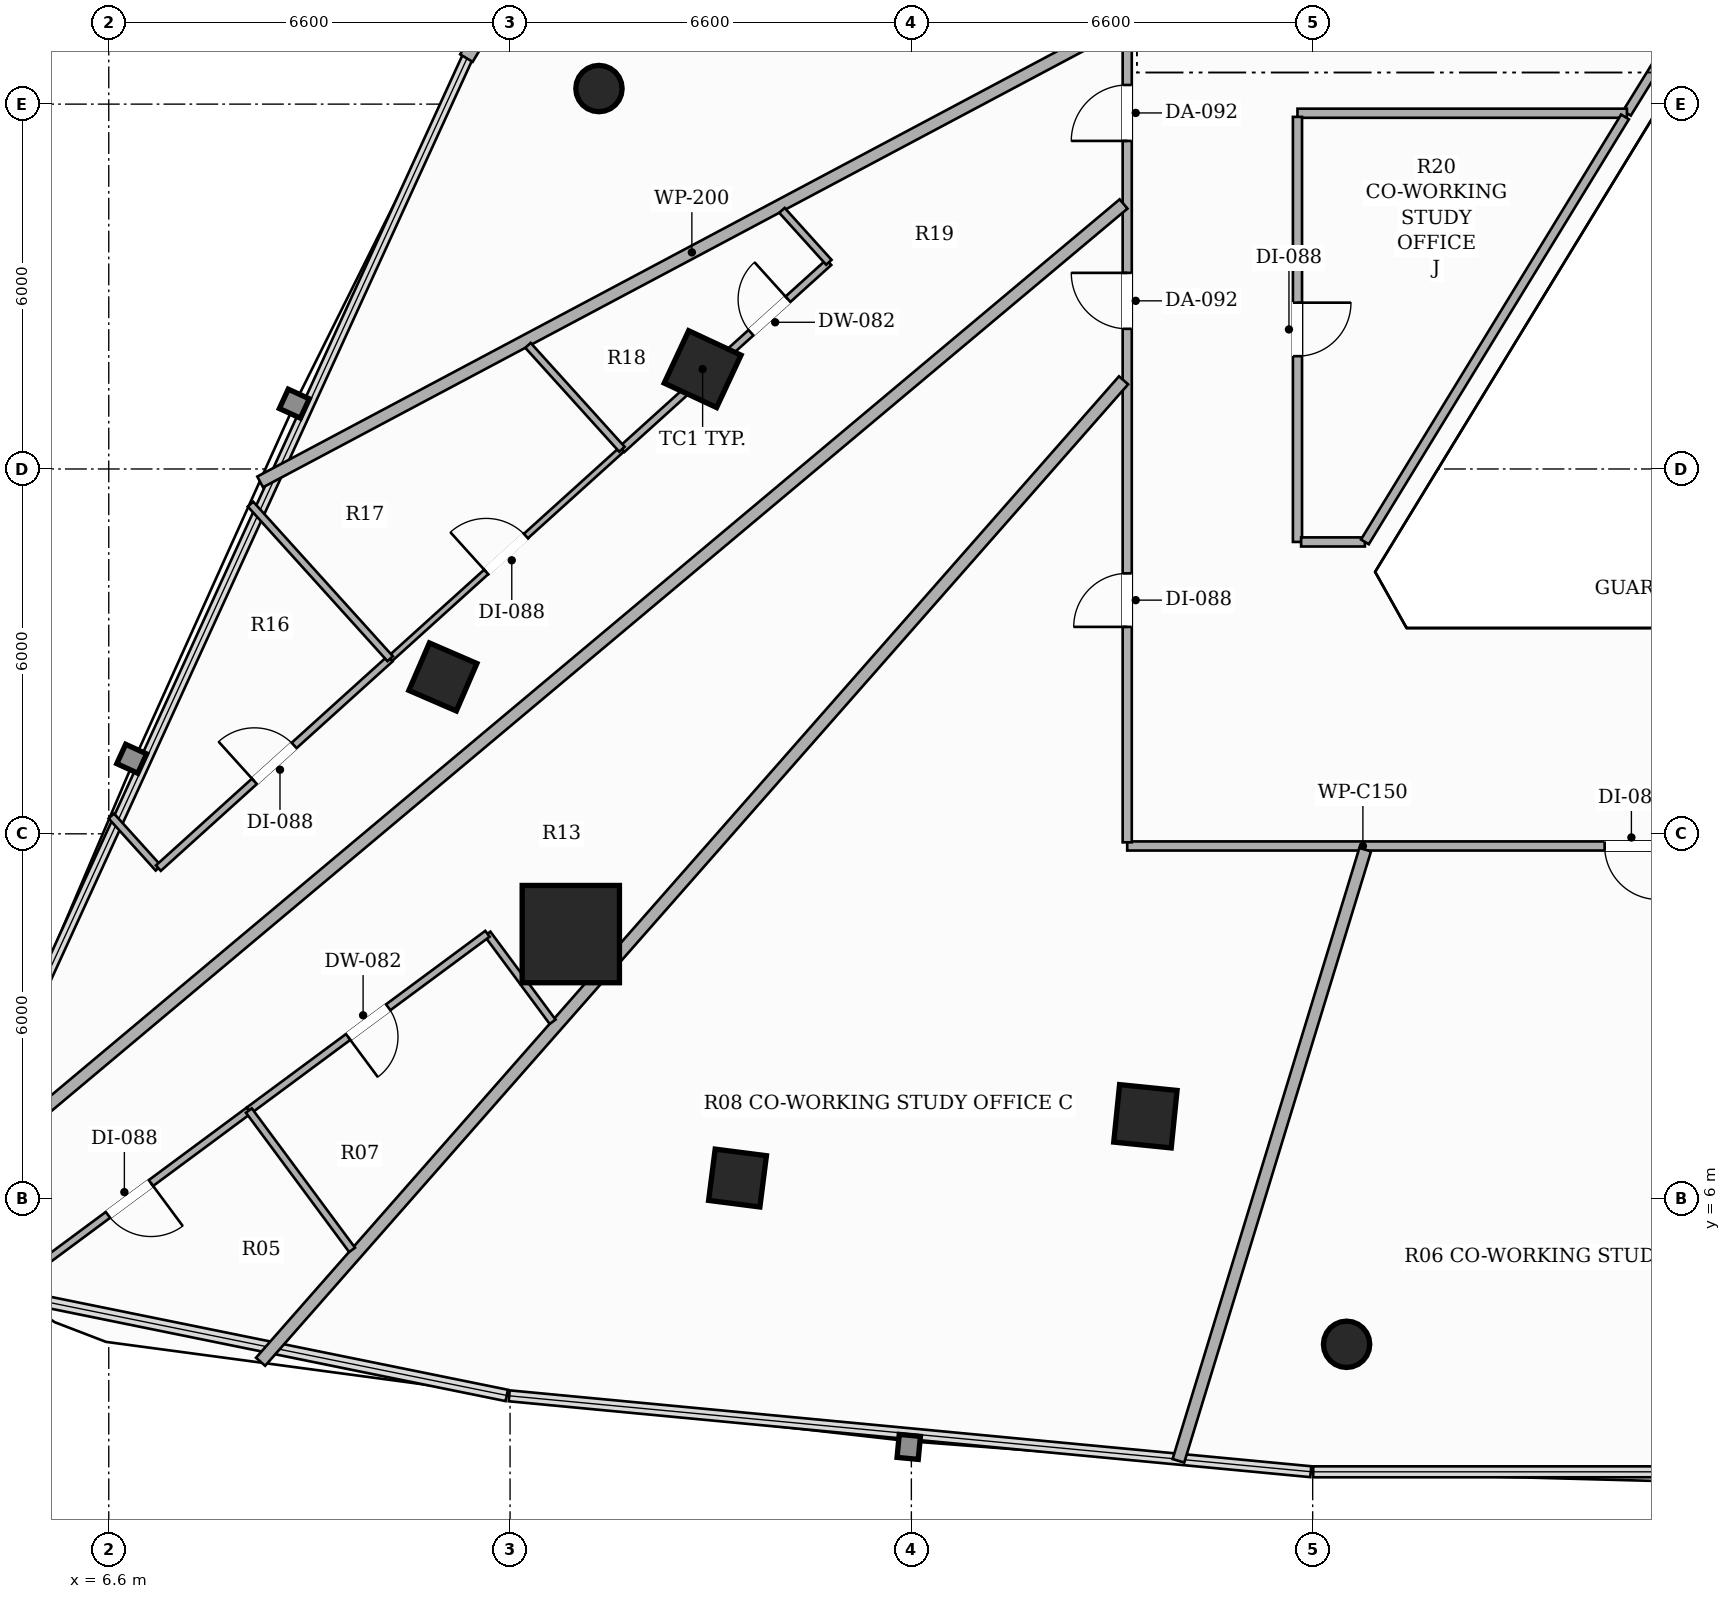
"""IFC4 building model, lengths in metres.
Left out: names, types, materials, properties, quantities, classifications, styles, units other than length and angle.
Written with IfcOpenShell. Run it as: python <this file> out.ifc"""

import sys

from ifc_helpers import new_model, si_unit, direction, frame, frame_2d, origin, origin_2d, place, context, subcontext, project, spatial, rectangle, hollow_rectangle, hollow_circle, extrude, element, fill, save


model = new_model("IFC4")
c1 = context("Model", 3, precision=1e-05, world=origin(), true_north=direction((0.0, 1.0)))
c2 = subcontext(c1, "Body", "Model", "MODEL_VIEW")
j1 = project(units=[si_unit("LENGTHUNIT", "METRE"), si_unit("PLANEANGLEUNIT", "RADIAN")], contexts=[c1])
p1 = place(None, origin())
s1 = spatial("IfcSite", under=j1, at=p1, CompositionType="ELEMENT")
p2 = place(p1, origin())
s2 = spatial("IfcBuilding", under=s1, at=p2, CompositionType="ELEMENT")
p3 = place(p2, frame((0.0, 0.0, 43.4)))
s3 = spatial("IfcBuildingStorey", under=s2, at=p3, CompositionType="ELEMENT", Elevation=43.4)
p4 = place(p3, frame((14.199, 10.351, 0.0), z_axis=(0.0, 0.0, 1.0), x_axis=(1.0, 0.0, 0.0)))
e1 = element("IfcColumn", 1, at=p4, inside=s3, PredefinedType="COLUMN", context=c2, shape_type="SweptSolid", body=[
    extrude(hollow_rectangle(XDim=1.6, YDim=1.6, WallThickness=0.05, at=origin_2d()), origin(), (0.0, 0.0, 1.0), 3.3),
])
for number, where, z_axis, x_axis in (
    (2, (16.367, 19.642, 0.0), (0.0, 0.0, 1.0), (0.423, 0.906, 0.0)),
    (3, (23.649, 7.355, 0.0), (0.0, 0.0, 1.0), (-0.995, 0.101, 0.0)),
):
    element("IfcColumn", number, at=place(p3, frame(where, z_axis=z_axis, x_axis=x_axis)), inside=s3, PredefinedType="COLUMN", context=c2, shape_type="SweptSolid", body=[
        extrude(hollow_rectangle(XDim=0.95, YDim=0.95, WallThickness=0.032, at=origin_2d()), origin(), (0.0, 0.0, 1.0), 3.3),
    ])
for number, where, z_axis, x_axis in (
    (4, (12.095, 14.58, 0.0), (0.0, 0.0, 1.0), (0.397, 0.918, 0.0)),
    (5, (16.941, 6.339, 0.0), (0.0, 0.0, 1.0), (-0.992, 0.127, 0.0)),
):
    element("IfcColumn", number, at=place(p3, frame(where, z_axis=z_axis, x_axis=x_axis)), inside=s3, PredefinedType="COLUMN", context=c2, shape_type="SweptSolid", body=[
        extrude(hollow_rectangle(XDim=0.85, YDim=0.85, WallThickness=0.028, at=origin_2d()), origin(), (0.0, 0.0, 1.0), 3.3),
    ])
for number, where, z_axis, x_axis in (
    (6, (14.662, 24.256, 0.0), (0.0, 0.0, 1.0), (1.0, 0.0, 0.0)),
    (7, (26.958, 3.605, 0.0), (0.0, 0.0, 1.0), (1.0, 0.0, 0.0)),
):
    element("IfcColumn", number, at=place(p3, frame(where, z_axis=z_axis, x_axis=x_axis)), inside=s3, PredefinedType="COLUMN", context=c2, shape_type="SweptSolid", body=[
        extrude(hollow_circle(Radius=0.381, WallThickness=0.022, at=origin_2d()), origin(), (0.0, 0.0, 1.0), 3.3),
    ])
p5 = place(p3, frame((19.162, 35.896, 0.0), z_axis=(0.0, 0.0, 1.0), x_axis=(-0.514316069528, -0.857600711652, 0.0)))
e8 = element("IfcWall", 8, at=p5, inside=s3, PredefinedType="SOLIDWALL", context=c2, shape_type="SweptSolid", body=[
    extrude(rectangle(XDim=12.989, YDim=0.24, at=frame_2d((6.494, 0.0))), origin(), (0.0, 0.0, 1.0), 2.624),
])
p6 = place(p5, frame((10.491, 0.0, 0.0)))
e9 = element("IfcOpeningElement", 9, at=p6, cuts=e8, PredefinedType="OPENING", context=c2, shape_type="SweptSolid", body=[
    extrude(rectangle(XDim=1.8, YDim=2.2, at=frame_2d((0.9, 1.1))), frame((0.0, 0.13, 0.0), z_axis=(0.0, -1.0, 0.0), x_axis=(1.0, 0.0, 0.0)), (0.0, 0.0, 1.0), 0.26),
])
p7 = place(p3, frame((42.59, 11.8, 0.0), z_axis=(0.0, 0.0, 1.0), x_axis=(-1.0, 0.0, 0.0)))
e10 = element("IfcWall", 10, at=p7, inside=s3, PredefinedType="PARTITIONING", context=c2, shape_type="SweptSolid", body=[
    extrude(rectangle(XDim=19.24, YDim=0.15, at=frame_2d((9.62, 0.0))), origin(), (0.0, 0.0, 1.0), 2.669),
])
p8 = place(p7, frame((10.508, 0.0, 0.0)))
e11 = element("IfcOpeningElement", 11, at=p8, cuts=e10, PredefinedType="OPENING", context=c2, shape_type="SweptSolid", body=[
    extrude(rectangle(XDim=0.88, YDim=2.1, at=frame_2d((0.44, 1.05))), frame((0.0, 0.085, 0.0), z_axis=(0.0, -1.0, 0.0), x_axis=(1.0, 0.0, 0.0)), (0.0, 0.0, 1.0), 0.17),
])
p9 = place(p7, frame((2.98, 0.0, 0.0)))
e12 = element("IfcOpeningElement", 12, at=p9, cuts=e10, PredefinedType="OPENING", context=c2, shape_type="SweptSolid", body=[
    extrude(rectangle(XDim=0.92, YDim=2.15, at=frame_2d((0.46, 1.075))), frame((0.0, 0.085, 0.0), z_axis=(0.0, -1.0, 0.0), x_axis=(1.0, 0.0, 0.0)), (0.0, 0.0, 1.0), 0.17),
])
p10 = place(p3, frame((23.35, 11.86, 0.0), z_axis=(0.0, 0.0, 1.0), x_axis=(0.0, 1.0, 0.0)))
e13 = element("IfcWall", 13, at=p10, inside=s3, PredefinedType="PARTITIONING", context=c2, shape_type="SweptSolid", body=[
    extrude(rectangle(XDim=25.04, YDim=0.15, at=frame_2d((12.52, 0.0))), origin(), (0.0, 0.0, 1.0), 2.413),
])
p11 = place(p10, frame((18.67, 0.0, 0.0)))
e14 = element("IfcOpeningElement", 14, at=p11, cuts=e13, PredefinedType="OPENING", context=c2, shape_type="SweptSolid", body=[
    extrude(rectangle(XDim=0.88, YDim=2.1, at=frame_2d((0.44, 1.05))), frame((0.0, 0.085, 0.0), z_axis=(0.0, -1.0, 0.0), x_axis=(1.0, 0.0, 0.0)), (0.0, 0.0, 1.0), 0.17),
])
p12 = place(p10, frame((3.543, 0.0, 0.0)))
e15 = element("IfcOpeningElement", 15, at=p12, cuts=e13, PredefinedType="OPENING", context=c2, shape_type="SweptSolid", body=[
    extrude(rectangle(XDim=0.88, YDim=2.1, at=frame_2d((0.44, 1.05))), frame((0.0, 0.085, 0.0), z_axis=(0.0, -1.0, 0.0), x_axis=(1.0, 0.0, 0.0)), (0.0, 0.0, 1.0), 0.17),
])
p13 = place(p10, frame((8.445, 0.0, 0.0)))
e16 = element("IfcOpeningElement", 16, at=p13, cuts=e13, PredefinedType="OPENING", context=c2, shape_type="SweptSolid", body=[
    extrude(rectangle(XDim=0.92, YDim=2.15, at=frame_2d((0.46, 1.075))), frame((0.0, 0.085, 0.0), z_axis=(0.0, -1.0, 0.0), x_axis=(1.0, 0.0, 0.0)), (0.0, 0.0, 1.0), 0.17),
])
p14 = place(p10, frame((11.535, 0.0, 0.0)))
e17 = element("IfcOpeningElement", 17, at=p14, cuts=e13, PredefinedType="OPENING", context=c2, shape_type="SweptSolid", body=[
    extrude(rectangle(XDim=0.92, YDim=2.15, at=frame_2d((0.46, 1.075))), frame((0.0, 0.085, 0.0), z_axis=(0.0, -1.0, 0.0), x_axis=(1.0, 0.0, 0.0)), (0.0, 0.0, 1.0), 0.17),
])
p15 = place(p3, frame((32.129, 24.758, 0.0), z_axis=(0.0, 0.0, 1.0), x_axis=(-0.525488010188, -0.850801005611, 0.0)))
e18 = element("IfcWall", 18, at=p15, inside=s3, PredefinedType="PARTITIONING", context=c2, shape_type="SweptSolid", body=[
    extrude(rectangle(XDim=1.067, YDim=0.15, at=frame_2d((0.534, 0.0))), origin(), (0.0, 0.0, 1.0), 3.06),
])
p16 = place(p3, frame((31.568, 23.85, 0.0), z_axis=(0.0, 0.0, 1.0), x_axis=(-1.0, 0.0, 0.0)))
e19 = element("IfcWall", 19, at=p16, inside=s3, PredefinedType="PARTITIONING", context=c2, shape_type="SweptSolid", body=[
    extrude(rectangle(XDim=5.418, YDim=0.15, at=frame_2d((2.709, 0.0))), origin(), (0.0, 0.0, 1.0), 2.669),
])
p17 = place(p3, frame((26.15, 23.79, 0.0), z_axis=(0.0, 0.0, 1.0), x_axis=(0.0, -1.0, 0.0)))
e20 = element("IfcWall", 20, at=p17, inside=s3, PredefinedType="PARTITIONING", context=c2, shape_type="SweptSolid", body=[
    extrude(rectangle(XDim=6.99, YDim=0.15, at=frame_2d((3.495, 0.0))), origin(), (0.0, 0.0, 1.0), 2.669),
])
p18 = place(p17, frame((3.055, 0.0, 0.0)))
e21 = element("IfcOpeningElement", 21, at=p18, cuts=e20, PredefinedType="OPENING", context=c2, shape_type="SweptSolid", body=[
    extrude(rectangle(XDim=0.88, YDim=2.1, at=frame_2d((0.44, 1.05))), frame((0.0, 0.085, 0.0), z_axis=(0.0, -1.0, 0.0), x_axis=(1.0, 0.0, 0.0)), (0.0, 0.0, 1.0), 0.17),
])
p19 = place(p3, frame((26.21, 16.8, 0.0), z_axis=(0.0, 0.0, 1.0), x_axis=(1.0, 0.0, 0.0)))
e22 = element("IfcWall", 22, at=p19, inside=s3, PredefinedType="PARTITIONING", context=c2, shape_type="SweptSolid", body=[
    extrude(rectangle(XDim=1.049, YDim=0.15, at=frame_2d((0.524, 0.0))), origin(), (0.0, 0.0, 1.0), 3.06),
])
p20 = place(p3, frame((27.259, 16.801, 0.0), z_axis=(0.0, 0.0, 1.0), x_axis=(0.522072924527, 0.852900850906, 0.0)))
e23 = element("IfcWall", 23, at=p20, inside=s3, PredefinedType="PARTITIONING", context=c2, shape_type="SweptSolid", body=[
    extrude(rectangle(XDim=8.194, YDim=0.15, at=frame_2d((4.097, 0.0))), origin(), (0.0, 0.0, 1.0), 2.669),
])
p21 = place(p3, frame((23.29, 25.337, 0.0), z_axis=(0.0, 0.0, 1.0), x_axis=(-0.882959018112, -0.469450074379, 0.0)))
e24 = element("IfcWall", 24, at=p21, inside=s3, PredefinedType="PARTITIONING", context=c2, shape_type="SweptSolid", body=[
    extrude(rectangle(XDim=16.082, YDim=0.2, at=frame_2d((8.041, 0.0))), origin(), (0.0, 0.0, 1.0), 2.413),
])
p22 = place(p3, frame((27.264, 11.74, 0.0), z_axis=(0.0, 0.0, 1.0), x_axis=(-0.292294665238, -0.956328305904, 0.0)))
e25 = element("IfcWall", 25, at=p22, inside=s3, PredefinedType="PARTITIONING", context=c2, shape_type="SweptSolid", body=[
    extrude(rectangle(XDim=10.51, YDim=0.2, at=frame_2d((5.255, 0.0))), origin(), (0.0, 0.0, 1.0), 2.413),
])
p23 = place(p3, frame((9.097, 3.318, 0.0), z_axis=(0.0, 0.0, 1.0), x_axis=(0.66036589704, 0.750943993935, 0.0)))
e26 = element("IfcWall", 26, at=p23, inside=s3, PredefinedType="PARTITIONING", context=c2, shape_type="SweptSolid", body=[
    extrude(rectangle(XDim=21.493, YDim=0.2, at=frame_2d((10.747, 0.0))), origin(), (0.0, 0.0, 1.0), 2.413),
])
p24 = place(p3, frame((4.362, 6.486, 0.0), z_axis=(0.0, 0.0, 1.0), x_axis=(0.766256370513, 0.642534959865, 0.0)))
e27 = element("IfcWall", 27, at=p24, inside=s3, PredefinedType="PARTITIONING", context=c2, shape_type="SweptSolid", body=[
    extrude(rectangle(XDim=24.702, YDim=0.2, at=frame_2d((12.351, 0.0))), origin(), (0.0, 0.0, 1.0), 2.413),
])
p25 = place(p3, frame((13.9, 8.909, 0.0), z_axis=(0.0, 0.0, 1.0), x_axis=(-0.595282665334, 0.803516364708, 0.0)))
e28 = element("IfcWall", 28, at=p25, inside=s3, PredefinedType="PARTITIONING", context=c2, shape_type="SweptSolid", body=[
    extrude(rectangle(XDim=1.801, YDim=0.12, at=frame_2d((0.9, 0.0))), origin(), (0.0, 0.0, 1.0), 3.06),
])
p26 = place(p3, frame((12.828, 10.356, 0.0), z_axis=(0.0, 0.0, 1.0), x_axis=(-0.803609449498, -0.595156998344, 0.0)))
e29 = element("IfcWall", 29, at=p26, inside=s3, PredefinedType="PARTITIONING", context=c2, shape_type="SweptSolid", body=[
    extrude(rectangle(XDim=4.883, YDim=0.12, at=frame_2d((2.441, 0.0))), origin(), (0.0, 0.0, 1.0), 2.619),
])
p27 = place(p26, frame((2.031, 0.0, 0.0)))
e30 = element("IfcOpeningElement", 30, at=p27, cuts=e29, PredefinedType="OPENING", context=c2, shape_type="SweptSolid", body=[
    extrude(rectangle(XDim=0.82, YDim=2.1, at=frame_2d((0.41, 1.05))), frame((0.0, 0.07, 0.0), z_axis=(0.0, -1.0, 0.0), x_axis=(1.0, 0.0, 0.0)), (0.0, 0.0, 1.0), 0.14),
])
p28 = place(p3, frame((8.904, 7.45, 0.0), z_axis=(0.0, 0.0, 1.0), x_axis=(-0.803552768464, -0.595233524168, 0.0)))
e31 = element("IfcWall", 31, at=p28, inside=s3, PredefinedType="PARTITIONING", context=c2, shape_type="SweptSolid", body=[
    extrude(rectangle(XDim=4.887, YDim=0.12, at=frame_2d((2.443, 0.0))), origin(), (0.0, 0.0, 1.0), 3.06),
])
p29 = place(p28, frame((2.004, 0.0, 0.0)))
e32 = element("IfcOpeningElement", 32, at=p29, cuts=e31, PredefinedType="OPENING", context=c2, shape_type="SweptSolid", body=[
    extrude(rectangle(XDim=0.88, YDim=2.1, at=frame_2d((0.44, 1.05))), frame((0.0, 0.07, 0.0), z_axis=(0.0, -1.0, 0.0), x_axis=(1.0, 0.0, 0.0)), (0.0, 0.0, 1.0), 0.14),
])
p30 = place(p3, frame((10.602, 5.158, 0.0), z_axis=(0.0, 0.0, 1.0), x_axis=(-0.595278721497, 0.803519286472, 0.0)))
e33 = element("IfcWall", 33, at=p30, inside=s3, PredefinedType="PARTITIONING", context=c2, shape_type="SweptSolid", body=[
    extrude(rectangle(XDim=2.853, YDim=0.12, at=frame_2d((1.426, 0.0))), origin(), (0.0, 0.0, 1.0), 3.06),
])
p31 = place(p3, frame((15.04, 18.324, 0.0), z_axis=(0.0, 0.0, 1.0), x_axis=(0.741971948415, 0.670430926916, 0.0)))
e34 = element("IfcWall", 34, at=p31, inside=s3, PredefinedType="PARTITIONING", context=c2, shape_type="SweptSolid", body=[
    extrude(rectangle(XDim=4.586, YDim=0.12, at=frame_2d((2.293, 0.0))), origin(), (0.0, 0.0, 1.0), 2.413),
])
p32 = place(p31, frame((2.86, 0.0, 0.0)))
e35 = element("IfcOpeningElement", 35, at=p32, cuts=e34, PredefinedType="OPENING", context=c2, shape_type="SweptSolid", body=[
    extrude(rectangle(XDim=0.82, YDim=2.1, at=frame_2d((0.41, 1.05))), frame((0.0, 0.07, 0.0), z_axis=(0.0, -1.0, 0.0), x_axis=(1.0, 0.0, 0.0)), (0.0, 0.0, 1.0), 0.14),
])
p33 = place(p3, frame((18.443, 21.399, 0.0), z_axis=(0.0, 0.0, 1.0), x_axis=(-0.670112835353, 0.742259245746, 0.0)))
e36 = element("IfcWall", 36, at=p33, inside=s3, PredefinedType="PARTITIONING", context=c2, shape_type="SweptSolid", body=[
    extrude(rectangle(XDim=1.151, YDim=0.12, at=frame_2d((0.575, 0.0))), origin(), (0.0, 0.0, 1.0), 2.669),
])
p34 = place(p3, frame((6.642, 12.293, 0.0), z_axis=(0.0, 0.0, 1.0), x_axis=(0.670248695606, -0.742136568321, 0.0)))
e37 = element("IfcWall", 37, at=p34, inside=s3, PredefinedType="PARTITIONING", context=c2, shape_type="SweptSolid", body=[
    extrude(rectangle(XDim=1.155, YDim=0.12, at=frame_2d((0.577, 0.0))), origin(), (0.0, 0.0, 1.0), 2.619),
])
p35 = place(p3, frame((7.416, 11.436, 0.0), z_axis=(0.0, 0.0, 1.0), x_axis=(0.742030958457, 0.670365614192, 0.0)))
e38 = element("IfcWall", 38, at=p35, inside=s3, PredefinedType="PARTITIONING", context=c2, shape_type="SweptSolid", body=[
    extrude(rectangle(XDim=5.137, YDim=0.12, at=frame_2d((2.569, 0.0))), origin(), (0.0, 0.0, 1.0), 2.619),
])
p36 = place(p35, frame((2.129, 0.0, 0.0)))
e39 = element("IfcOpeningElement", 39, at=p36, cuts=e38, PredefinedType="OPENING", context=c2, shape_type="SweptSolid", body=[
    extrude(rectangle(XDim=0.88, YDim=2.1, at=frame_2d((0.44, 1.05))), frame((0.0, 0.07, 0.0), z_axis=(0.0, -1.0, 0.0), x_axis=(1.0, 0.0, 0.0)), (0.0, 0.0, 1.0), 0.14),
])
p37 = place(p3, frame((11.228, 14.88, 0.0), z_axis=(0.0, 0.0, 1.0), x_axis=(0.742007319068, 0.670391779819, 0.0)))
e40 = element("IfcWall", 40, at=p37, inside=s3, PredefinedType="PARTITIONING", context=c2, shape_type="SweptSolid", body=[
    extrude(rectangle(XDim=5.137, YDim=0.1, at=frame_2d((2.569, 0.0))), origin(), (0.0, 0.0, 1.0), 2.413),
])
p38 = place(p37, frame((2.129, 0.0, 0.0)))
e41 = element("IfcOpeningElement", 41, at=p38, cuts=e40, PredefinedType="OPENING", context=c2, shape_type="SweptSolid", body=[
    extrude(rectangle(XDim=0.88, YDim=2.1, at=frame_2d((0.44, 1.05))), frame((0.0, 0.06, 0.0), z_axis=(0.0, -1.0, 0.0), x_axis=(1.0, 0.0, 0.0)), (0.0, 0.0, 1.0), 0.12),
])
p39 = place(p3, frame((15.04, 18.324, 0.0), z_axis=(0.0, 0.0, 1.0), x_axis=(-0.670602478911, 0.741816901451, 0.0)))
e42 = element("IfcWall", 42, at=p39, inside=s3, PredefinedType="PARTITIONING", context=c2, shape_type="SweptSolid", body=[
    extrude(rectangle(XDim=2.304, YDim=0.12, at=frame_2d((1.152, 0.0))), origin(), (0.0, 0.0, 1.0), 2.413),
])
p40 = place(p3, frame((8.931, 17.422, 0.0), z_axis=(0.0, 0.0, 1.0), x_axis=(0.670431816202, -0.741971144873, 0.0)))
e43 = element("IfcWall", 43, at=p40, inside=s3, PredefinedType="PARTITIONING", context=c2, shape_type="SweptSolid", body=[
    extrude(rectangle(XDim=3.426, YDim=0.12, at=frame_2d((1.713, 0.0))), origin(), (0.0, 0.0, 1.0), 3.06),
])
p41 = place(p12, origin())
e44 = element("IfcDoor", 44, at=p41, inside=s3, OperationType="SINGLE_SWING_LEFT", PredefinedType="DOOR", context=c2, shape_type="SweptSolid", body=[
    extrude(rectangle(XDim=0.88, YDim=2.1, at=frame_2d((0.44, 1.05))), frame((0.0, 0.025, 0.0), z_axis=(0.0, -1.0, 0.0), x_axis=(1.0, 0.0, 0.0)), (0.0, 0.0, 1.0), 0.05),
])
fill(e15, e44)
p42 = place(p8, origin())
e45 = element("IfcDoor", 45, at=p42, inside=s3, OperationType="SINGLE_SWING_LEFT", PredefinedType="DOOR", context=c2, shape_type="SweptSolid", body=[
    extrude(rectangle(XDim=0.88, YDim=2.1, at=frame_2d((0.44, 1.05))), frame((0.0, 0.025, 0.0), z_axis=(0.0, -1.0, 0.0), x_axis=(1.0, 0.0, 0.0)), (0.0, 0.0, 1.0), 0.05),
])
fill(e11, e45)
p43 = place(p13, origin())
e46 = element("IfcDoor", 46, at=p43, inside=s3, OperationType="SINGLE_SWING_RIGHT", PredefinedType="DOOR", context=c2, shape_type="SweptSolid", body=[
    extrude(rectangle(XDim=0.92, YDim=2.15, at=frame_2d((0.46, 1.075))), frame((0.0, 0.025, 0.0), z_axis=(0.0, -1.0, 0.0), x_axis=(1.0, 0.0, 0.0)), (0.0, 0.0, 1.0), 0.05),
])
fill(e16, e46)
p44 = place(p27, origin())
e47 = element("IfcDoor", 47, at=p44, inside=s3, OperationType="SINGLE_SWING_RIGHT", PredefinedType="DOOR", context=c2, shape_type="SweptSolid", body=[
    extrude(rectangle(XDim=0.82, YDim=2.1, at=frame_2d((0.41, 1.05))), frame((0.0, 0.025, 0.0), z_axis=(0.0, -1.0, 0.0), x_axis=(1.0, 0.0, 0.0)), (0.0, 0.0, 1.0), 0.05),
])
fill(e30, e47)
p45 = place(p29, origin())
e48 = element("IfcDoor", 48, at=p45, inside=s3, OperationType="SINGLE_SWING_LEFT", PredefinedType="DOOR", context=c2, shape_type="SweptSolid", body=[
    extrude(rectangle(XDim=0.88, YDim=2.1, at=frame_2d((0.44, 1.05))), frame((0.0, 0.025, 0.0), z_axis=(0.0, -1.0, 0.0), x_axis=(1.0, 0.0, 0.0)), (0.0, 0.0, 1.0), 0.05),
])
fill(e32, e48)
p46 = place(p14, origin())
e49 = element("IfcDoor", 49, at=p46, inside=s3, OperationType="SINGLE_SWING_LEFT", PredefinedType="DOOR", context=c2, shape_type="SweptSolid", body=[
    extrude(rectangle(XDim=0.92, YDim=2.15, at=frame_2d((0.46, 1.075))), frame((0.0, 0.025, 0.0), z_axis=(0.0, -1.0, 0.0), x_axis=(1.0, 0.0, 0.0)), (0.0, 0.0, 1.0), 0.05),
])
fill(e17, e49)
p47 = place(p32, origin())
e50 = element("IfcDoor", 50, at=p47, inside=s3, OperationType="SINGLE_SWING_RIGHT", PredefinedType="DOOR", context=c2, shape_type="SweptSolid", body=[
    extrude(rectangle(XDim=0.82, YDim=2.1, at=frame_2d((0.41, 1.05))), frame((0.0, 0.025, 0.0), z_axis=(0.0, -1.0, 0.0), x_axis=(1.0, 0.0, 0.0)), (0.0, 0.0, 1.0), 0.05),
])
fill(e35, e50)
p48 = place(p36, origin())
e51 = element("IfcDoor", 51, at=p48, inside=s3, OperationType="SINGLE_SWING_LEFT", PredefinedType="DOOR", context=c2, shape_type="SweptSolid", body=[
    extrude(rectangle(XDim=0.88, YDim=2.1, at=frame_2d((0.44, 1.05))), frame((0.0, 0.025, 0.0), z_axis=(0.0, -1.0, 0.0), x_axis=(1.0, 0.0, 0.0)), (0.0, 0.0, 1.0), 0.05),
])
fill(e39, e51)
p49 = place(p38, origin())
e52 = element("IfcDoor", 52, at=p49, inside=s3, OperationType="SINGLE_SWING_LEFT", PredefinedType="DOOR", context=c2, shape_type="SweptSolid", body=[
    extrude(rectangle(XDim=0.88, YDim=2.1, at=frame_2d((0.44, 1.05))), frame((0.0, 0.025, 0.0), z_axis=(0.0, -1.0, 0.0), x_axis=(1.0, 0.0, 0.0)), (0.0, 0.0, 1.0), 0.05),
])
fill(e41, e52)
p50 = place(p18, origin())
e53 = element("IfcDoor", 53, at=p50, inside=s3, OperationType="SINGLE_SWING_LEFT", PredefinedType="DOOR", context=c2, shape_type="SweptSolid", body=[
    extrude(rectangle(XDim=0.88, YDim=2.1, at=frame_2d((0.44, 1.05))), frame((0.0, 0.025, 0.0), z_axis=(0.0, -1.0, 0.0), x_axis=(1.0, 0.0, 0.0)), (0.0, 0.0, 1.0), 0.05),
])
fill(e21, e53)
save(model, sys.argv[1])
